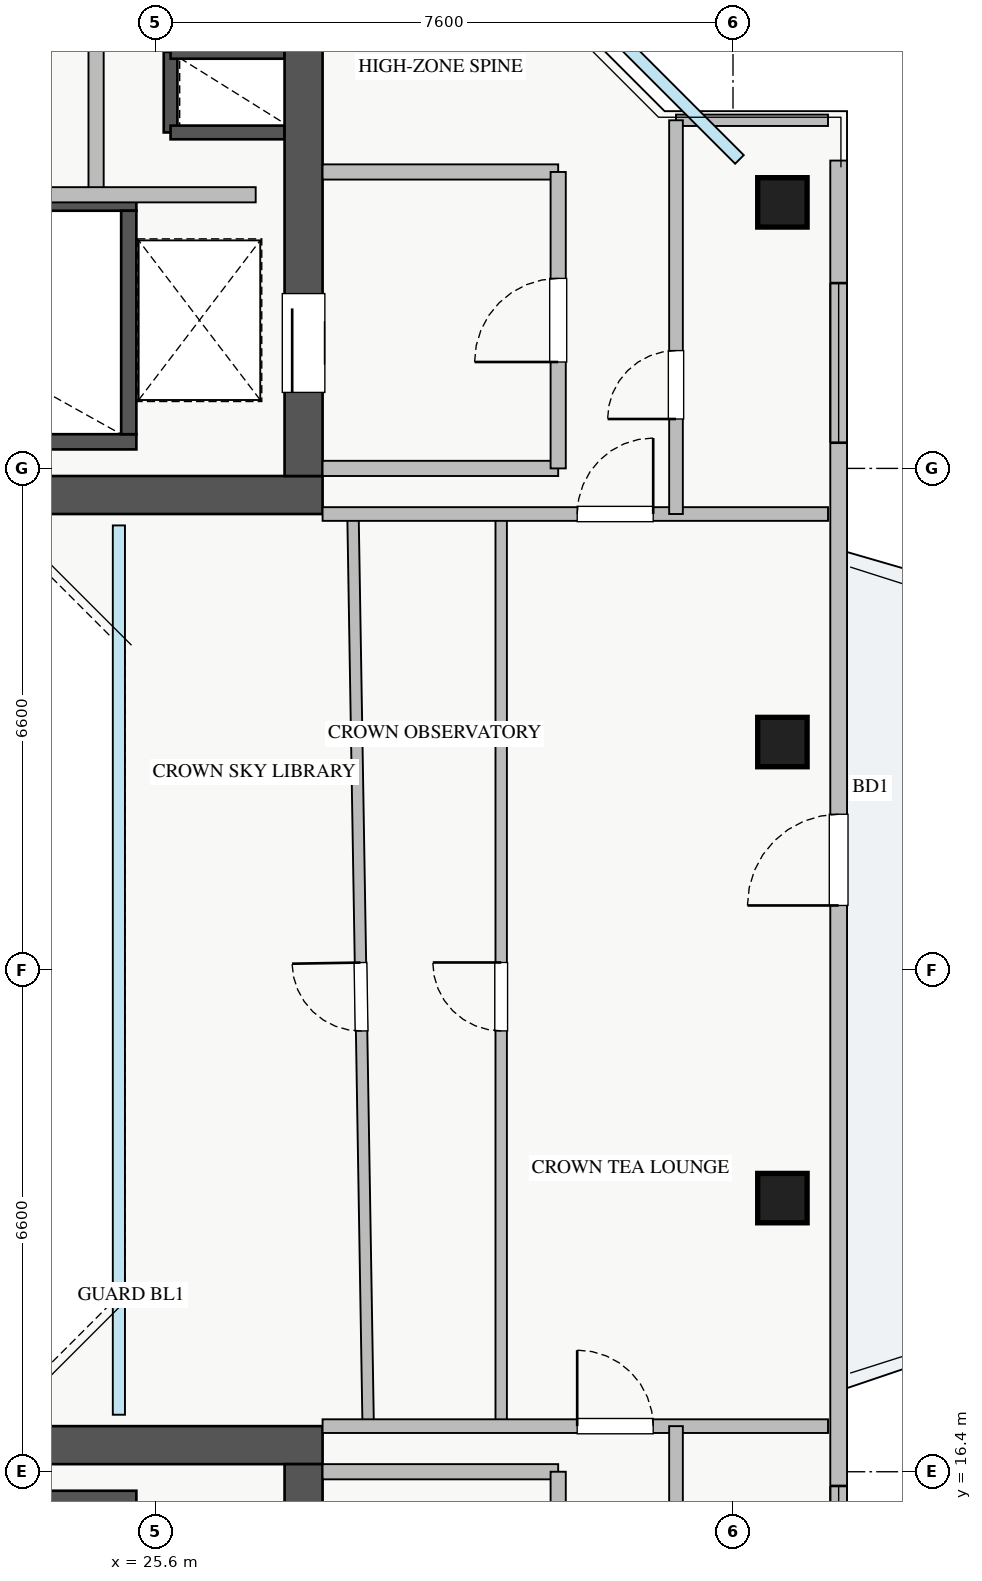
"""IFC4 building model, lengths in metres.
Left out: names, types, materials, properties, quantities, classifications, styles, units other than length and angle.
Written with IfcOpenShell. Run it as: python <this file> out.ifc"""

import sys

from ifc_helpers import new_model, si_unit, direction, frame, frame_2d, origin, origin_2d, place, context, subcontext, project, spatial, rectangle, extrude, source, transform, mapped, element, fill, save


model = new_model("IFC4")
c1 = context("Model", 3, precision=1e-05, world=origin(), true_north=direction((0.0, 1.0)))
c2 = subcontext(c1, "Body", "Model", "MODEL_VIEW")
j1 = project(units=[si_unit("LENGTHUNIT", "METRE"), si_unit("PLANEANGLEUNIT", "RADIAN")], contexts=[c1])
p1 = place(None, origin())
s1 = spatial("IfcSite", under=j1, at=p1, CompositionType="ELEMENT")
p2 = place(p1, origin())
s2 = spatial("IfcBuilding", under=s1, at=p2, CompositionType="ELEMENT")
p3 = place(p2, frame((0.0, 0.0, 256.75)))
s3 = spatial("IfcBuildingStorey", under=s2, at=p3, CompositionType="ELEMENT", Elevation=256.75)
p4 = place(p3, frame((25.8, 34.02, 0.0), z_axis=(0.0, 0.0, 1.0), x_axis=(0.0, 1.0, 0.0)))
e1 = element("IfcWall", 1, at=p4, inside=s3, PredefinedType="SHEAR", context=c2, shape_type="SweptSolid", body=[
    extrude(rectangle(XDim=1.06, YDim=0.18, at=frame_2d((0.53, 0.0))), origin(), (0.0, 0.0, 1.0), 3.07),
])
for number, where, z_axis, x_axis in (
    (2, (25.8, 35.08, 0.0), (0.0, 0.0, 1.0), (1.0, 0.0, 0.0)),
    (3, (25.8, 34.02, 0.0), (0.0, 0.0, 1.0), (1.0, 0.0, 0.0)),
):
    element("IfcWall", number, at=place(p3, frame(where, z_axis=z_axis, x_axis=x_axis)), inside=s3, PredefinedType="SHEAR", context=c2, shape_type="SweptSolid", body=[
        extrude(rectangle(XDim=1.5, YDim=0.18, at=frame_2d((0.75, 0.0))), origin(), (0.0, 0.0, 1.0), 3.07),
    ])
p5 = place(p3, frame((18.2, 29.95, 0.0), z_axis=(0.0, 0.0, 1.0), x_axis=(1.0, 0.0, 0.0)))
e4 = element("IfcWall", 4, at=p5, inside=s3, PredefinedType="SHEAR", context=c2, shape_type="SweptSolid", body=[
    extrude(rectangle(XDim=7.15, YDim=0.2, at=frame_2d((3.575, 0.0))), origin(), (0.0, 0.0, 1.0), 3.25),
])
p6 = place(p3, frame((18.2, 33.09, 0.0), z_axis=(0.0, 0.0, 1.0), x_axis=(1.0, 0.0, 0.0)))
e5 = element("IfcWall", 5, at=p6, inside=s3, PredefinedType="SHEAR", context=c2, shape_type="SweptSolid", body=[
    extrude(rectangle(XDim=7.15, YDim=0.2, at=frame_2d((3.575, 0.0))), origin(), (0.0, 0.0, 1.0), 3.25),
])
p7 = place(p6, frame((0.35, 0.0, 0.0)))
e6 = element("IfcOpeningElement", 6, at=p7, cuts=e5, PredefinedType="OPENING", context=c2, shape_type="SweptSolid", body=[
    extrude(rectangle(XDim=1.1, YDim=2.05, at=frame_2d((0.55, 1.025))), frame((0.0, 0.11, 0.0), z_axis=(0.0, -1.0, 0.0), x_axis=(1.0, 0.0, 0.0)), (0.0, 0.0, 1.0), 0.22),
])
p8 = place(p3, frame((25.25, 30.05, 0.0), z_axis=(0.0, 0.0, 1.0), x_axis=(0.0, 1.0, 0.0)))
e7 = element("IfcWall", 7, at=p8, inside=s3, PredefinedType="SHEAR", context=c2, shape_type="SweptSolid", body=[
    extrude(rectangle(XDim=2.94, YDim=0.2, at=frame_2d((1.47, 0.0))), origin(), (0.0, 0.0, 1.0), 3.25),
])
p9 = place(p3, frame((18.2, 16.05, 0.0), z_axis=(0.0, 0.0, 1.0), x_axis=(1.0, 0.0, 0.0)))
e8 = element("IfcWall", 8, at=p9, inside=s3, PredefinedType="SHEAR", context=c2, shape_type="SweptSolid", body=[
    extrude(rectangle(XDim=7.15, YDim=0.2, at=frame_2d((3.575, 0.0))), origin(), (0.0, 0.0, 1.0), 3.25),
])
p10 = place(p3, frame((10.2, 29.25, 0.0), z_axis=(0.0, 0.0, 1.0), x_axis=(1.0, 0.0, 0.0)))
e9 = element("IfcWall", 9, at=p10, inside=s3, PredefinedType="SHEAR", context=c2, shape_type="SweptSolid", body=[
    extrude(rectangle(XDim=17.6, YDim=0.5, at=frame_2d((8.8, 0.0))), origin(), (0.0, 0.0, 1.0), 3.25),
])
p11 = place(p3, frame((27.55, 29.5, 0.0), z_axis=(0.0, 0.0, 1.0), x_axis=(0.0, 1.0, 0.0)))
e10 = element("IfcWall", 10, at=p11, inside=s3, PredefinedType="SHEAR", context=c2, shape_type="SweptSolid", body=[
    extrude(rectangle(XDim=6.2, YDim=0.5, at=frame_2d((3.1, 0.0))), origin(), (0.0, 0.0, 1.0), 3.25),
])
p12 = place(p11, frame((1.1, 0.0, 0.0)))
e11 = element("IfcOpeningElement", 11, at=p12, cuts=e10, PredefinedType="OPENING", context=c2, shape_type="SweptSolid", body=[
    extrude(rectangle(XDim=1.3, YDim=2.05, at=frame_2d((0.65, 1.025))), frame((0.0, 0.26, 0.0), z_axis=(0.0, -1.0, 0.0), x_axis=(1.0, 0.0, 0.0)), (0.0, 0.0, 1.0), 0.52),
])
p13 = place(p3, frame((10.2, 16.75, 0.0), z_axis=(0.0, 0.0, 1.0), x_axis=(1.0, 0.0, 0.0)))
e12 = element("IfcWall", 12, at=p13, inside=s3, PredefinedType="SHEAR", context=c2, shape_type="SweptSolid", body=[
    extrude(rectangle(XDim=17.6, YDim=0.5, at=frame_2d((8.8, 0.0))), origin(), (0.0, 0.0, 1.0), 3.25),
])
p14 = place(p3, frame((27.55, 10.3, 0.0), z_axis=(0.0, 0.0, 1.0), x_axis=(0.0, 1.0, 0.0)))
e13 = element("IfcWall", 13, at=p14, inside=s3, PredefinedType="SHEAR", context=c2, shape_type="SweptSolid", body=[
    extrude(rectangle(XDim=6.2, YDim=0.5, at=frame_2d((3.1, 0.0))), origin(), (0.0, 0.0, 1.0), 3.25),
])
p15 = place(p14, frame((2.1, 0.0, 0.0)))
e14 = element("IfcOpeningElement", 14, at=p15, cuts=e13, PredefinedType="OPENING", context=c2, shape_type="SweptSolid", body=[
    extrude(rectangle(XDim=1.3, YDim=2.05, at=frame_2d((0.65, 1.025))), frame((0.0, 0.26, 0.0), z_axis=(0.0, -1.0, 0.0), x_axis=(1.0, 0.0, 0.0)), (0.0, 0.0, 1.0), 0.52),
])
m1 = source(origin(), c2, "Body", "SweptSolid", [
    extrude(rectangle(XDim=0.65, YDim=0.65, at=origin_2d()), origin(), (0.0, 0.0, 1.0), 3.25),
])
for number, where, z_axis, x_axis in (
    (15, (33.85, 20.0, 0.0), (0.0, 0.0, 1.0), (1.0, 0.0, 0.0)),
    (16, (33.85, 26.0, 0.0), (0.0, 0.0, 1.0), (1.0, 0.0, 0.0)),
    (17, (33.85, 33.1, 0.0), (0.0, 0.0, 1.0), (1.0, 0.0, 0.0)),
):
    element("IfcColumn", number, at=place(p3, frame(where, z_axis=z_axis, x_axis=x_axis)), inside=s3, PredefinedType="COLUMN", context=c2, shape_type="MappedRepresentation", body=[
        mapped(m1, transform((0.0, 0.0, 0.0), x_axis=(1.0, 0.0, 0.0), y_axis=(0.0, 1.0, 0.0), z_axis=(0.0, 0.0, 1.0), scale=1.0)),
    ])
p16 = place(p3, frame((34.59, 12.35, 0.0), z_axis=(0.0, 0.0, 1.0), x_axis=(0.0, 1.0, 0.0)))
e18 = element("IfcWall", 18, at=p16, inside=s3, PredefinedType="STANDARD", context=c2, shape_type="SweptSolid", body=[
    extrude(rectangle(XDim=21.3, YDim=0.22, at=frame_2d((10.65, 0.0))), origin(), (0.0, 0.0, 1.0), 2.61),
])
p17 = place(p16, frame((11.5, 0.0, 0.0)))
e19 = element("IfcOpeningElement", 19, at=p17, cuts=e18, PredefinedType="OPENING", context=c2, shape_type="SweptSolid", body=[
    extrude(rectangle(XDim=1.2, YDim=2.1, at=frame_2d((0.6, 1.05))), frame((0.0, 0.12, 0.0), z_axis=(0.0, -1.0, 0.0), x_axis=(1.0, 0.0, 0.0)), (0.0, 0.0, 1.0), 0.24),
])
p18 = place(p16, frame((1.463, 0.0, 0.9)))
e20 = element("IfcOpeningElement", 20, at=p18, cuts=e18, PredefinedType="OPENING", context=c2, shape_type="SweptSolid", body=[
    extrude(rectangle(XDim=2.4, YDim=1.48, at=frame_2d((1.2, 0.74))), frame((0.0, 0.12, 0.0), z_axis=(0.0, -1.0, 0.0), x_axis=(1.0, 0.0, 0.0)), (0.0, 0.0, 1.0), 0.24),
])
p19 = place(p16, frame((17.588, 0.0, 0.9)))
e21 = element("IfcOpeningElement", 21, at=p19, cuts=e18, PredefinedType="OPENING", context=c2, shape_type="SweptSolid", body=[
    extrude(rectangle(XDim=2.1, YDim=1.48, at=frame_2d((1.05, 0.74))), frame((0.0, 0.12, 0.0), z_axis=(0.0, -1.0, 0.0), x_axis=(1.0, 0.0, 0.0)), (0.0, 0.0, 1.0), 0.24),
])
for number, where, z_axis, x_axis in (
    (22, (27.8, 29.6, 0.0), (0.0, 0.0, 1.0), (1.0, 0.0, 0.0)),
    (23, (27.8, 33.5, 0.0), (0.0, 0.0, 1.0), (1.0, 0.0, 0.0)),
):
    element("IfcWall", number, at=place(p3, frame(where, z_axis=z_axis, x_axis=x_axis)), inside=s3, PredefinedType="PARTITIONING", context=c2, shape_type="SweptSolid", body=[
        extrude(rectangle(XDim=3.1, YDim=0.2, at=frame_2d((1.55, 0.0))), origin(), (0.0, 0.0, 1.0), 3.07),
    ])
p20 = place(p3, frame((30.9, 29.6, 0.0), z_axis=(0.0, 0.0, 1.0), x_axis=(0.0, 1.0, 0.0)))
e24 = element("IfcWall", 24, at=p20, inside=s3, PredefinedType="PARTITIONING", context=c2, shape_type="SweptSolid", body=[
    extrude(rectangle(XDim=3.9, YDim=0.2, at=frame_2d((1.95, 0.0))), origin(), (0.0, 0.0, 1.0), 2.815),
])
p21 = place(p20, frame((1.4, 0.0, 0.0)))
e25 = element("IfcOpeningElement", 25, at=p21, cuts=e24, PredefinedType="OPENING", context=c2, shape_type="SweptSolid", body=[
    extrude(rectangle(XDim=1.1, YDim=2.05, at=frame_2d((0.55, 1.025))), frame((0.0, 0.11, 0.0), z_axis=(0.0, -1.0, 0.0), x_axis=(1.0, 0.0, 0.0)), (0.0, 0.0, 1.0), 0.22),
])
p22 = place(p3, frame((27.8, 16.4, 0.0), z_axis=(0.0, 0.0, 1.0), x_axis=(1.0, 0.0, 0.0)))
e26 = element("IfcWall", 26, at=p22, inside=s3, PredefinedType="PARTITIONING", context=c2, shape_type="SweptSolid", body=[
    extrude(rectangle(XDim=3.1, YDim=0.2, at=frame_2d((1.55, 0.0))), origin(), (0.0, 0.0, 1.0), 3.07),
])
p23 = place(p3, frame((30.9, 12.5, 0.0), z_axis=(0.0, 0.0, 1.0), x_axis=(0.0, 1.0, 0.0)))
e27 = element("IfcWall", 27, at=p23, inside=s3, PredefinedType="PARTITIONING", context=c2, shape_type="SweptSolid", body=[
    extrude(rectangle(XDim=3.9, YDim=0.2, at=frame_2d((1.95, 0.0))), origin(), (0.0, 0.0, 1.0), 2.815),
])
p24 = place(p23, frame((1.4, 0.0, 0.0)))
e28 = element("IfcOpeningElement", 28, at=p24, cuts=e27, PredefinedType="OPENING", context=c2, shape_type="SweptSolid", body=[
    extrude(rectangle(XDim=1.1, YDim=2.05, at=frame_2d((0.55, 1.025))), frame((0.0, 0.11, 0.0), z_axis=(0.0, -1.0, 0.0), x_axis=(1.0, 0.0, 0.0)), (0.0, 0.0, 1.0), 0.22),
])
p25 = place(p3, frame((24.82, 33.2, 0.0), z_axis=(0.0, 0.0, 1.0), x_axis=(0.0, 1.0, 0.0)))
e29 = element("IfcWall", 29, at=p25, inside=s3, PredefinedType="PARTITIONING", context=c2, shape_type="SweptSolid", body=[
    extrude(rectangle(XDim=2.65, YDim=0.2, at=frame_2d((1.325, 0.0))), origin(), (0.0, 0.0, 1.0), 3.07),
])
p26 = place(p3, frame((21.75, 33.2, 0.0), z_axis=(0.0, 0.0, 1.0), x_axis=(1.0, 0.0, 0.0)))
e30 = element("IfcWall", 30, at=p26, inside=s3, PredefinedType="PARTITIONING", context=c2, shape_type="SweptSolid", body=[
    extrude(rectangle(XDim=5.17, YDim=0.2, at=frame_2d((2.585, 0.0))), origin(), (0.0, 0.0, 1.0), 3.07),
])
p27 = place(p3, frame((28.2, 29.0, 0.0), z_axis=(0.0, 0.0, 1.0), x_axis=(0.016660285018, -0.99986120782, 0.0)))
e31 = element("IfcWall", 31, at=p27, inside=s3, PredefinedType="PARTITIONING", context=c2, shape_type="SweptSolid", body=[
    extrude(rectangle(XDim=12.002, YDim=0.15, at=frame_2d((6.001, 0.0))), origin(), (0.0, 0.0, 1.0), 3.07),
])
p28 = place(p27, frame((5.902, 0.0, 0.0)))
e32 = element("IfcOpeningElement", 32, at=p28, cuts=e31, PredefinedType="OPENING", context=c2, shape_type="SweptSolid", body=[
    extrude(rectangle(XDim=0.9, YDim=2.05, at=frame_2d((0.45, 1.025))), frame((0.0, 0.085, 0.0), z_axis=(0.0, -1.0, 0.0), x_axis=(1.0, 0.0, 0.0)), (0.0, 0.0, 1.0), 0.17),
])
p29 = place(p3, frame((30.15, 17.0, 0.0), z_axis=(0.0, 0.0, 1.0), x_axis=(0.0, 1.0, 0.0)))
e33 = element("IfcWall", 33, at=p29, inside=s3, PredefinedType="PARTITIONING", context=c2, shape_type="SweptSolid", body=[
    extrude(rectangle(XDim=12.0, YDim=0.15, at=frame_2d((6.0, 0.0))), origin(), (0.0, 0.0, 1.0), 3.07),
])
p30 = place(p29, frame((5.2, 0.0, 0.0)))
e34 = element("IfcOpeningElement", 34, at=p30, cuts=e33, PredefinedType="OPENING", context=c2, shape_type="SweptSolid", body=[
    extrude(rectangle(XDim=0.9, YDim=2.05, at=frame_2d((0.45, 1.025))), frame((0.0, 0.085, 0.0), z_axis=(0.0, -1.0, 0.0), x_axis=(1.0, 0.0, 0.0)), (0.0, 0.0, 1.0), 0.17),
])
p31 = place(p3, frame((27.8, 17.0, 0.0), z_axis=(0.0, 0.0, 1.0), x_axis=(1.0, 0.0, 0.0)))
e35 = element("IfcWall", 35, at=p31, inside=s3, PredefinedType="PARTITIONING", context=c2, shape_type="SweptSolid", body=[
    extrude(rectangle(XDim=6.65, YDim=0.18, at=frame_2d((3.325, 0.0))), origin(), (0.0, 0.0, 1.0), 3.07),
])
p32 = place(p31, frame((3.35, 0.0, 0.0)))
e36 = element("IfcOpeningElement", 36, at=p32, cuts=e35, PredefinedType="OPENING", context=c2, shape_type="SweptSolid", body=[
    extrude(rectangle(XDim=1.0, YDim=2.05, at=frame_2d((0.5, 1.025))), frame((0.0, 0.1, 0.0), z_axis=(0.0, -1.0, 0.0), x_axis=(1.0, 0.0, 0.0)), (0.0, 0.0, 1.0), 0.2),
])
p33 = place(p3, frame((27.8, 29.0, 0.0), z_axis=(0.0, 0.0, 1.0), x_axis=(1.0, 0.0, 0.0)))
e37 = element("IfcWall", 37, at=p33, inside=s3, PredefinedType="PARTITIONING", context=c2, shape_type="SweptSolid", body=[
    extrude(rectangle(XDim=6.65, YDim=0.18, at=frame_2d((3.325, 0.0))), origin(), (0.0, 0.0, 1.0), 3.07),
])
p34 = place(p33, frame((3.35, 0.0, 0.0)))
e38 = element("IfcOpeningElement", 38, at=p34, cuts=e37, PredefinedType="OPENING", context=c2, shape_type="SweptSolid", body=[
    extrude(rectangle(XDim=1.0, YDim=2.05, at=frame_2d((0.5, 1.025))), frame((0.0, 0.1, 0.0), z_axis=(0.0, -1.0, 0.0), x_axis=(1.0, 0.0, 0.0)), (0.0, 0.0, 1.0), 0.2),
])
p35 = place(p3, frame((32.45, 34.18, 0.0), z_axis=(0.0, 0.0, 1.0), x_axis=(1.0, 0.0, 0.0)))
e39 = element("IfcWall", 39, at=p35, inside=s3, PredefinedType="PARTITIONING", context=c2, shape_type="SweptSolid", body=[
    extrude(rectangle(XDim=2.0, YDim=0.15, at=frame_2d((1.0, 0.0))), origin(), (0.0, 0.0, 1.0), 3.07),
])
p36 = place(p3, frame((32.45, 29.0, 0.0), z_axis=(0.0, 0.0, 1.0), x_axis=(0.0, 1.0, 0.0)))
e40 = element("IfcWall", 40, at=p36, inside=s3, PredefinedType="PARTITIONING", context=c2, shape_type="SweptSolid", body=[
    extrude(rectangle(XDim=5.18, YDim=0.18, at=frame_2d((2.59, 0.0))), origin(), (0.0, 0.0, 1.0), 3.07),
])
p37 = place(p36, frame((1.25, 0.0, 0.0)))
e41 = element("IfcOpeningElement", 41, at=p37, cuts=e40, PredefinedType="OPENING", context=c2, shape_type="SweptSolid", body=[
    extrude(rectangle(XDim=0.9, YDim=2.05, at=frame_2d((0.45, 1.025))), frame((0.0, 0.1, 0.0), z_axis=(0.0, -1.0, 0.0), x_axis=(1.0, 0.0, 0.0)), (0.0, 0.0, 1.0), 0.2),
])
p38 = place(p3, frame((32.45, 11.82, 0.0), z_axis=(0.0, 0.0, 1.0), x_axis=(0.0, 1.0, 0.0)))
e42 = element("IfcWall", 42, at=p38, inside=s3, PredefinedType="PARTITIONING", context=c2, shape_type="SweptSolid", body=[
    extrude(rectangle(XDim=5.18, YDim=0.18, at=frame_2d((2.59, 0.0))), origin(), (0.0, 0.0, 1.0), 3.07),
])
p39 = place(p38, frame((1.25, 0.0, 0.0)))
e43 = element("IfcOpeningElement", 43, at=p39, cuts=e42, PredefinedType="OPENING", context=c2, shape_type="SweptSolid", body=[
    extrude(rectangle(XDim=0.9, YDim=2.05, at=frame_2d((0.45, 1.025))), frame((0.0, 0.1, 0.0), z_axis=(0.0, -1.0, 0.0), x_axis=(1.0, 0.0, 0.0)), (0.0, 0.0, 1.0), 0.2),
])
m2 = source(origin(), c2, "Body", "SweptSolid", [
    extrude(rectangle(XDim=1.2, YDim=2.1, at=frame_2d((0.6, 1.05))), frame((0.0, 0.025, 0.0), z_axis=(0.0, -1.0, 0.0), x_axis=(1.0, 0.0, 0.0)), (0.0, 0.0, 1.0), 0.05),
])
p40 = place(p17, origin())
e44 = element("IfcDoor", 44, at=p40, inside=s3, OperationType="SINGLE_SWING_LEFT", PredefinedType="DOOR", context=c2, shape_type="MappedRepresentation", body=[
    mapped(m2, transform((0.0, 0.0, 0.0), x_axis=(1.0, 0.0, 0.0), y_axis=(0.0, 1.0, 0.0), z_axis=(0.0, 0.0, 1.0), scale=1.0)),
])
fill(e19, e44)
m3 = source(origin(), c2, "Body", "SweptSolid", [
    extrude(rectangle(XDim=2.4, YDim=1.48, at=frame_2d((1.2, 0.74))), frame((0.0, 0.03, 0.0), z_axis=(0.0, -1.0, 0.0), x_axis=(1.0, 0.0, 0.0)), (0.0, 0.0, 1.0), 0.06),
])
p41 = place(p18, origin())
e45 = element("IfcWindow", 45, at=p41, inside=s3, PartitioningType="TRIPLE_PANEL_VERTICAL", PredefinedType="WINDOW", context=c2, shape_type="MappedRepresentation", body=[
    mapped(m3, transform((0.0, 0.0, 0.0), x_axis=(1.0, 0.0, 0.0), y_axis=(0.0, 1.0, 0.0), z_axis=(0.0, 0.0, 1.0), scale=1.0)),
])
fill(e20, e45)
m4 = source(origin(), c2, "Body", "SweptSolid", [
    extrude(rectangle(XDim=2.1, YDim=1.48, at=frame_2d((1.05, 0.74))), frame((0.0, 0.03, 0.0), z_axis=(0.0, -1.0, 0.0), x_axis=(1.0, 0.0, 0.0)), (0.0, 0.0, 1.0), 0.06),
])
p42 = place(p19, origin())
e46 = element("IfcWindow", 46, at=p42, inside=s3, PartitioningType="TRIPLE_PANEL_VERTICAL", PredefinedType="WINDOW", context=c2, shape_type="MappedRepresentation", body=[
    mapped(m4, transform((0.0, 0.0, 0.0), x_axis=(1.0, 0.0, 0.0), y_axis=(0.0, 1.0, 0.0), z_axis=(0.0, 0.0, 1.0), scale=1.0)),
])
fill(e21, e46)
m5 = source(origin(), c2, "Body", "SweptSolid", [
    extrude(rectangle(XDim=1.3, YDim=2.05, at=frame_2d((0.65, 1.025))), frame((0.0, 0.025, 0.0), z_axis=(0.0, -1.0, 0.0), x_axis=(1.0, 0.0, 0.0)), (0.0, 0.0, 1.0), 0.05),
])
p43 = place(p12, origin())
e47 = element("IfcDoor", 47, at=p43, inside=s3, OperationType="SLIDING_TO_LEFT", PredefinedType="DOOR", context=c2, shape_type="MappedRepresentation", body=[
    mapped(m5, transform((0.0, 0.0, 0.0), x_axis=(1.0, 0.0, 0.0), y_axis=(0.0, 1.0, 0.0), z_axis=(0.0, 0.0, 1.0), scale=1.0)),
])
fill(e11, e47)
m6 = source(origin(), c2, "Body", "SweptSolid", [
    extrude(rectangle(XDim=1.1, YDim=2.05, at=frame_2d((0.55, 1.025))), frame((0.0, 0.025, 0.0), z_axis=(0.0, -1.0, 0.0), x_axis=(1.0, 0.0, 0.0)), (0.0, 0.0, 1.0), 0.05),
])
p44 = place(p21, origin())
e48 = element("IfcDoor", 48, at=p44, inside=s3, OperationType="SINGLE_SWING_LEFT", PredefinedType="DOOR", context=c2, shape_type="MappedRepresentation", body=[
    mapped(m6, transform((0.0, 0.0, 0.0), x_axis=(1.0, 0.0, 0.0), y_axis=(0.0, 1.0, 0.0), z_axis=(0.0, 0.0, 1.0), scale=1.0)),
])
fill(e25, e48)
m7 = source(origin(), c2, "Body", "SweptSolid", [
    extrude(rectangle(XDim=0.9, YDim=2.05, at=frame_2d((0.45, 1.025))), frame((0.0, 0.025, 0.0), z_axis=(0.0, -1.0, 0.0), x_axis=(1.0, 0.0, 0.0)), (0.0, 0.0, 1.0), 0.05),
])
p45 = place(p28, frame((0.9, 0.0, 0.0), z_axis=(0.0, 0.0, 1.0), x_axis=(-1.0, 0.0, 0.0)))
e49 = element("IfcDoor", 49, at=p45, inside=s3, OperationType="SINGLE_SWING_LEFT", PredefinedType="DOOR", context=c2, shape_type="MappedRepresentation", body=[
    mapped(m7, transform((0.0, 0.0, 0.0), x_axis=(1.0, 0.0, 0.0), y_axis=(0.0, 1.0, 0.0), z_axis=(0.0, 0.0, 1.0), scale=1.0)),
])
fill(e32, e49)
p46 = place(p30, origin())
e50 = element("IfcDoor", 50, at=p46, inside=s3, OperationType="SINGLE_SWING_RIGHT", PredefinedType="DOOR", context=c2, shape_type="MappedRepresentation", body=[
    mapped(m7, transform((0.0, 0.0, 0.0), x_axis=(1.0, 0.0, 0.0), y_axis=(0.0, 1.0, 0.0), z_axis=(0.0, 0.0, 1.0), scale=1.0)),
])
fill(e34, e50)
m8 = source(origin(), c2, "Body", "SweptSolid", [
    extrude(rectangle(XDim=1.0, YDim=2.05, at=frame_2d((0.5, 1.025))), frame((0.0, 0.025, 0.0), z_axis=(0.0, -1.0, 0.0), x_axis=(1.0, 0.0, 0.0)), (0.0, 0.0, 1.0), 0.05),
])
p47 = place(p32, origin())
e51 = element("IfcDoor", 51, at=p47, inside=s3, OperationType="SINGLE_SWING_LEFT", PredefinedType="DOOR", context=c2, shape_type="MappedRepresentation", body=[
    mapped(m8, transform((0.0, 0.0, 0.0), x_axis=(1.0, 0.0, 0.0), y_axis=(0.0, 1.0, 0.0), z_axis=(0.0, 0.0, 1.0), scale=1.0)),
])
fill(e36, e51)
p48 = place(p34, origin())
e52 = element("IfcDoor", 52, at=p48, inside=s3, OperationType="SINGLE_SWING_RIGHT", PredefinedType="DOOR", context=c2, shape_type="MappedRepresentation", body=[
    mapped(m8, transform((0.0, 0.0, 0.0), x_axis=(1.0, 0.0, 0.0), y_axis=(0.0, 1.0, 0.0), z_axis=(0.0, 0.0, 1.0), scale=1.0)),
])
fill(e38, e52)
p49 = place(p37, origin())
e53 = element("IfcDoor", 53, at=p49, inside=s3, OperationType="SINGLE_SWING_LEFT", PredefinedType="DOOR", context=c2, shape_type="MappedRepresentation", body=[
    mapped(m7, transform((0.0, 0.0, 0.0), x_axis=(1.0, 0.0, 0.0), y_axis=(0.0, 1.0, 0.0), z_axis=(0.0, 0.0, 1.0), scale=1.0)),
])
fill(e41, e53)
save(model, sys.argv[1])
